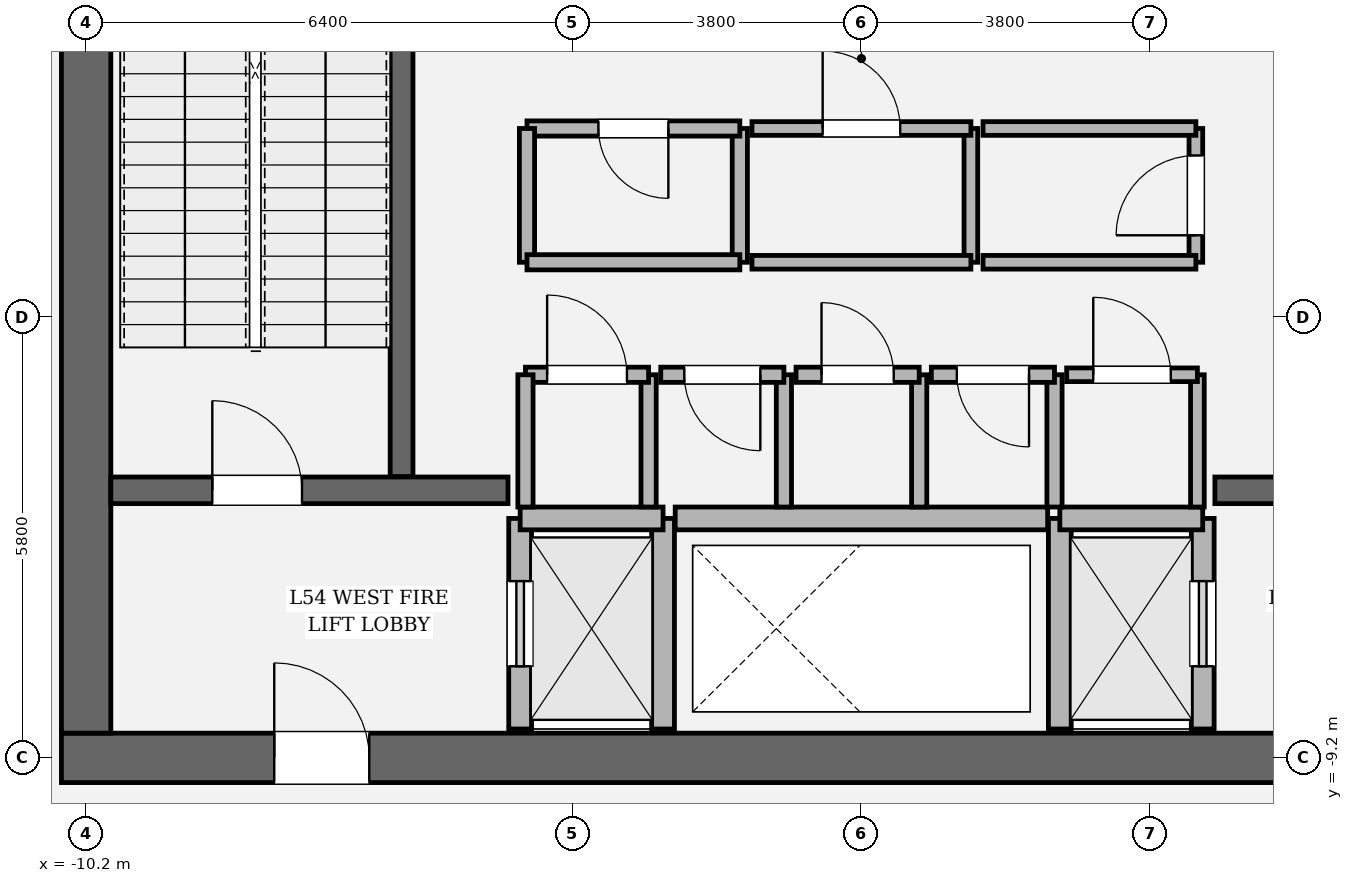
"""IFC4 building model, lengths in metres.
Left out: names, types, materials, properties, quantities, classifications, styles, units other than length and angle.
Written with IfcOpenShell. Run it as: python <this file> out.ifc"""

import sys

from ifc_helpers import new_model, si_unit, direction, frame, frame_2d, origin, place, context, subcontext, project, spatial, rectangle, extrude, element, fill, save


model = new_model("IFC4")
c1 = context("Model", 3, precision=1e-05, world=origin(), true_north=direction((0.0, 1.0)))
c2 = subcontext(c1, "Body", "Model", "MODEL_VIEW")
j1 = project(units=[si_unit("LENGTHUNIT", "METRE"), si_unit("PLANEANGLEUNIT", "RADIAN")], contexts=[c1])
p1 = place(None, origin())
s1 = spatial("IfcSite", under=j1, at=p1, CompositionType="ELEMENT")
p2 = place(p1, origin())
s2 = spatial("IfcBuilding", under=s1, at=p2, CompositionType="ELEMENT")
p3 = place(p2, frame((0.0, 0.0, 228.9)))
s3 = spatial("IfcBuildingStorey", under=s2, at=p3, CompositionType="ELEMENT", Elevation=228.9)
p4 = place(p3, frame((10.525, -9.2, 0.0), z_axis=(0.0, 0.0, 1.0), x_axis=(-1.0, 0.0, 0.0)))
e1 = element("IfcWall", 1, at=p4, inside=s3, PredefinedType="SHEAR", context=c2, shape_type="SweptSolid", body=[
    extrude(rectangle(XDim=21.05, YDim=0.65, at=frame_2d((10.525, 0.0))), origin(), (0.0, 0.0, 1.0), 4.05),
])
p5 = place(p4, frame((2.8, 0.0, 0.0)))
e2 = element("IfcOpeningElement", 2, at=p5, cuts=e1, PredefinedType="OPENING", context=c2, shape_type="SweptSolid", body=[
    extrude(rectangle(XDim=1.25, YDim=2.25, at=frame_2d((0.625, 1.125))), frame((0.0, 0.335, 0.0), z_axis=(0.0, -1.0, 0.0), x_axis=(1.0, 0.0, 0.0)), (0.0, 0.0, 1.0), 0.67),
])
p6 = place(p4, frame((17.0, 0.0, 0.0)))
e3 = element("IfcOpeningElement", 3, at=p6, cuts=e1, PredefinedType="OPENING", context=c2, shape_type="SweptSolid", body=[
    extrude(rectangle(XDim=1.25, YDim=2.25, at=frame_2d((0.625, 1.125))), frame((0.0, 0.335, 0.0), z_axis=(0.0, -1.0, 0.0), x_axis=(1.0, 0.0, 0.0)), (0.0, 0.0, 1.0), 0.67),
])
p7 = place(p3, frame((-10.2, -8.875, 0.0), z_axis=(0.0, 0.0, 1.0), x_axis=(0.0, 1.0, 0.0)))
e4 = element("IfcWall", 4, at=p7, inside=s3, PredefinedType="SHEAR", context=c2, shape_type="SweptSolid", body=[
    extrude(rectangle(XDim=17.75, YDim=0.65, at=frame_2d((8.875, 0.0))), origin(), (0.0, 0.0, 1.0), 4.05),
])
p8 = place(p7, frame((12.665, 0.0, 0.0)))
e5 = element("IfcOpeningElement", 5, at=p8, cuts=e4, PredefinedType="OPENING", context=c2, shape_type="SweptSolid", body=[
    extrude(rectangle(XDim=1.18, YDim=2.2, at=frame_2d((0.59, 1.1))), frame((0.0, 0.335, 0.0), z_axis=(0.0, -1.0, 0.0), x_axis=(1.0, 0.0, 0.0)), (0.0, 0.0, 1.0), 0.67),
])
p9 = place(p3, frame((-6.05, -5.5, 0.0), z_axis=(0.0, 0.0, 1.0), x_axis=(0.0, 1.0, 0.0)))
e6 = element("IfcWall", 6, at=p9, inside=s3, PredefinedType="SOLIDWALL", context=c2, shape_type="SweptSolid", body=[
    extrude(rectangle(XDim=8.95, YDim=0.3, at=frame_2d((4.475, 0.0))), origin(), (0.0, 0.0, 1.0), 4.05),
])
p10 = place(p3, frame((-9.875, -5.68, 0.0), z_axis=(0.0, 0.0, 1.0), x_axis=(1.0, 0.0, 0.0)))
e7 = element("IfcWall", 7, at=p10, inside=s3, PredefinedType="SOLIDWALL", context=c2, shape_type="SweptSolid", body=[
    extrude(rectangle(XDim=5.225, YDim=0.35, at=frame_2d((2.613, 0.0))), origin(), (0.0, 0.0, 1.0), 4.05),
])
p11 = place(p10, frame((1.335, 0.0, 0.0)))
e8 = element("IfcOpeningElement", 8, at=p11, cuts=e7, PredefinedType="OPENING", context=c2, shape_type="SweptSolid", body=[
    extrude(rectangle(XDim=1.18, YDim=2.2, at=frame_2d((0.59, 1.1))), frame((0.0, 0.185, 0.0), z_axis=(0.0, -1.0, 0.0), x_axis=(1.0, 0.0, 0.0)), (0.0, 0.0, 1.0), 0.37),
])
p12 = place(p3, frame((4.65, -5.68, 0.0), z_axis=(0.0, 0.0, 1.0), x_axis=(1.0, 0.0, 0.0)))
e9 = element("IfcWall", 9, at=p12, inside=s3, PredefinedType="SOLIDWALL", context=c2, shape_type="SweptSolid", body=[
    extrude(rectangle(XDim=5.225, YDim=0.35, at=frame_2d((2.613, 0.0))), origin(), (0.0, 0.0, 1.0), 4.05),
])
p13 = place(p12, frame((2.71, 0.0, 0.0)))
e10 = element("IfcOpeningElement", 10, at=p13, cuts=e9, PredefinedType="OPENING", context=c2, shape_type="SweptSolid", body=[
    extrude(rectangle(XDim=1.18, YDim=2.2, at=frame_2d((0.59, 1.1))), frame((0.0, 0.185, 0.0), z_axis=(0.0, -1.0, 0.0), x_axis=(1.0, 0.0, 0.0)), (0.0, 0.0, 1.0), 0.37),
])
p14 = place(p3, frame((-4.49, -8.82, 0.0), z_axis=(0.0, 0.0, 1.0), x_axis=(0.0, 1.0, 0.0)))
e11 = element("IfcWall", 11, at=p14, inside=s3, PredefinedType="SOLIDWALL", context=c2, shape_type="SweptSolid", body=[
    extrude(rectangle(XDim=2.77, YDim=0.3, at=frame_2d((1.385, 0.0))), origin(), (0.0, 0.0, 1.0), 3.83),
])
p15 = place(p14, frame((0.825, 0.0, 0.0)))
e12 = element("IfcOpeningElement", 12, at=p15, cuts=e11, PredefinedType="OPENING", context=c2, shape_type="SweptSolid", body=[
    extrude(rectangle(XDim=1.12, YDim=2.25, at=frame_2d((0.56, 1.125))), frame((0.0, 0.16, 0.0), z_axis=(0.0, -1.0, 0.0), x_axis=(1.0, 0.0, 0.0)), (0.0, 0.0, 1.0), 0.32),
])
p16 = place(p3, frame((-2.61, -8.82, 0.0), z_axis=(0.0, 0.0, 1.0), x_axis=(0.0, 1.0, 0.0)))
e13 = element("IfcWall", 13, at=p16, inside=s3, PredefinedType="SOLIDWALL", context=c2, shape_type="SweptSolid", body=[
    extrude(rectangle(XDim=2.77, YDim=0.3, at=frame_2d((1.385, 0.0))), origin(), (0.0, 0.0, 1.0), 3.83),
])
p17 = place(p3, frame((-4.49, -6.05, 0.0), z_axis=(0.0, 0.0, 1.0), x_axis=(1.0, 0.0, 0.0)))
e14 = element("IfcWall", 14, at=p17, inside=s3, PredefinedType="SOLIDWALL", context=c2, shape_type="SweptSolid", body=[
    extrude(rectangle(XDim=1.88, YDim=0.3, at=frame_2d((0.94, 0.0))), origin(), (0.0, 0.0, 1.0), 3.83),
])
p18 = place(p3, frame((4.49, -8.82, 0.0), z_axis=(0.0, 0.0, 1.0), x_axis=(0.0, 1.0, 0.0)))
e15 = element("IfcWall", 15, at=p18, inside=s3, PredefinedType="SOLIDWALL", context=c2, shape_type="SweptSolid", body=[
    extrude(rectangle(XDim=2.77, YDim=0.3, at=frame_2d((1.385, 0.0))), origin(), (0.0, 0.0, 1.0), 3.83),
])
p19 = place(p18, frame((0.825, 0.0, 0.0)))
e16 = element("IfcOpeningElement", 16, at=p19, cuts=e15, PredefinedType="OPENING", context=c2, shape_type="SweptSolid", body=[
    extrude(rectangle(XDim=1.12, YDim=2.25, at=frame_2d((0.56, 1.125))), frame((0.0, 0.16, 0.0), z_axis=(0.0, -1.0, 0.0), x_axis=(1.0, 0.0, 0.0)), (0.0, 0.0, 1.0), 0.32),
])
p20 = place(p3, frame((2.61, -8.82, 0.0), z_axis=(0.0, 0.0, 1.0), x_axis=(0.0, 1.0, 0.0)))
e17 = element("IfcWall", 17, at=p20, inside=s3, PredefinedType="SOLIDWALL", context=c2, shape_type="SweptSolid", body=[
    extrude(rectangle(XDim=2.77, YDim=0.3, at=frame_2d((1.385, 0.0))), origin(), (0.0, 0.0, 1.0), 3.83),
])
p21 = place(p3, frame((2.61, -6.05, 0.0), z_axis=(0.0, 0.0, 1.0), x_axis=(1.0, 0.0, 0.0)))
e18 = element("IfcWall", 18, at=p21, inside=s3, PredefinedType="SOLIDWALL", context=c2, shape_type="SweptSolid", body=[
    extrude(rectangle(XDim=1.88, YDim=0.3, at=frame_2d((0.94, 0.0))), origin(), (0.0, 0.0, 1.0), 3.83),
])
p22 = place(p3, frame((-2.45, -6.05, 0.0), z_axis=(0.0, 0.0, 1.0), x_axis=(1.0, 0.0, 0.0)))
e19 = element("IfcWall", 19, at=p22, inside=s3, PredefinedType="SOLIDWALL", context=c2, shape_type="SweptSolid", body=[
    extrude(rectangle(XDim=4.9, YDim=0.3, at=frame_2d((2.45, 0.0))), origin(), (0.0, 0.0, 1.0), 3.83),
])
p23 = place(p3, frame((-2.8, -5.9, 0.0), z_axis=(0.0, 0.0, 1.0), x_axis=(0.0, 1.0, 0.0)))
e20 = element("IfcWall", 20, at=p23, inside=s3, PredefinedType="SOLIDWALL", context=c2, shape_type="SweptSolid", body=[
    extrude(rectangle(XDim=1.74, YDim=0.2, at=frame_2d((0.87, 0.0))), origin(), (0.0, 0.0, 1.0), 3.83),
])
p24 = place(p3, frame((-2.8, -4.16, 0.0), z_axis=(0.0, 0.0, 1.0), x_axis=(-1.0, 0.0, 0.0)))
e21 = element("IfcWall", 21, at=p24, inside=s3, PredefinedType="SOLIDWALL", context=c2, shape_type="SweptSolid", body=[
    extrude(rectangle(XDim=1.62, YDim=0.2, at=frame_2d((0.81, 0.0))), origin(), (0.0, 0.0, 1.0), 3.83),
])
p25 = place(p24, frame((0.285, 0.0, 0.0)))
e22 = element("IfcOpeningElement", 22, at=p25, cuts=e21, PredefinedType="OPENING", context=c2, shape_type="SweptSolid", body=[
    extrude(rectangle(XDim=1.05, YDim=2.2, at=frame_2d((0.525, 1.1))), frame((0.0, 0.11, 0.0), z_axis=(0.0, -1.0, 0.0), x_axis=(1.0, 0.0, 0.0)), (0.0, 0.0, 1.0), 0.22),
])
for number, where, z_axis, x_axis in (
    (23, (-4.42, -4.16, 0.0), (0.0, 0.0, 1.0), (0.0, -1.0, 0.0)),
    (24, (-1.02, -5.9, 0.0), (0.0, 0.0, 1.0), (0.0, 1.0, 0.0)),
):
    element("IfcWall", number, at=place(p3, frame(where, z_axis=z_axis, x_axis=x_axis)), inside=s3, PredefinedType="SOLIDWALL", context=c2, shape_type="SweptSolid", body=[
        extrude(rectangle(XDim=1.74, YDim=0.2, at=frame_2d((0.87, 0.0))), origin(), (0.0, 0.0, 1.0), 3.83),
    ])
p26 = place(p3, frame((-1.02, -4.16, 0.0), z_axis=(0.0, 0.0, 1.0), x_axis=(-1.0, 0.0, 0.0)))
e25 = element("IfcWall", 25, at=p26, inside=s3, PredefinedType="SOLIDWALL", context=c2, shape_type="SweptSolid", body=[
    extrude(rectangle(XDim=1.62, YDim=0.2, at=frame_2d((0.81, 0.0))), origin(), (0.0, 0.0, 1.0), 3.83),
])
p27 = place(p26, frame((0.31, 0.0, 0.0)))
e26 = element("IfcOpeningElement", 26, at=p27, cuts=e25, PredefinedType="OPENING", context=c2, shape_type="SweptSolid", body=[
    extrude(rectangle(XDim=1.0, YDim=2.15, at=frame_2d((0.5, 1.075))), frame((0.0, 0.11, 0.0), z_axis=(0.0, -1.0, 0.0), x_axis=(1.0, 0.0, 0.0)), (0.0, 0.0, 1.0), 0.22),
])
p28 = place(p3, frame((0.76, -5.9, 0.0), z_axis=(0.0, 0.0, 1.0), x_axis=(0.0, 1.0, 0.0)))
e27 = element("IfcWall", 27, at=p28, inside=s3, PredefinedType="SOLIDWALL", context=c2, shape_type="SweptSolid", body=[
    extrude(rectangle(XDim=1.74, YDim=0.2, at=frame_2d((0.87, 0.0))), origin(), (0.0, 0.0, 1.0), 3.83),
])
p29 = place(p3, frame((0.76, -4.16, 0.0), z_axis=(0.0, 0.0, 1.0), x_axis=(-1.0, 0.0, 0.0)))
e28 = element("IfcWall", 28, at=p29, inside=s3, PredefinedType="SOLIDWALL", context=c2, shape_type="SweptSolid", body=[
    extrude(rectangle(XDim=1.62, YDim=0.2, at=frame_2d((0.81, 0.0))), origin(), (0.0, 0.0, 1.0), 3.83),
])
p30 = place(p29, frame((0.335, 0.0, 0.0)))
e29 = element("IfcOpeningElement", 29, at=p30, cuts=e28, PredefinedType="OPENING", context=c2, shape_type="SweptSolid", body=[
    extrude(rectangle(XDim=0.95, YDim=2.15, at=frame_2d((0.475, 1.075))), frame((0.0, 0.11, 0.0), z_axis=(0.0, -1.0, 0.0), x_axis=(1.0, 0.0, 0.0)), (0.0, 0.0, 1.0), 0.22),
])
p31 = place(p3, frame((2.54, -5.9, 0.0), z_axis=(0.0, 0.0, 1.0), x_axis=(0.0, 1.0, 0.0)))
e30 = element("IfcWall", 30, at=p31, inside=s3, PredefinedType="SOLIDWALL", context=c2, shape_type="SweptSolid", body=[
    extrude(rectangle(XDim=1.74, YDim=0.2, at=frame_2d((0.87, 0.0))), origin(), (0.0, 0.0, 1.0), 3.83),
])
p32 = place(p3, frame((2.54, -4.16, 0.0), z_axis=(0.0, 0.0, 1.0), x_axis=(-1.0, 0.0, 0.0)))
e31 = element("IfcWall", 31, at=p32, inside=s3, PredefinedType="SOLIDWALL", context=c2, shape_type="SweptSolid", body=[
    extrude(rectangle(XDim=1.62, YDim=0.2, at=frame_2d((0.81, 0.0))), origin(), (0.0, 0.0, 1.0), 3.83),
])
p33 = place(p32, frame((0.335, 0.0, 0.0)))
e32 = element("IfcOpeningElement", 32, at=p33, cuts=e31, PredefinedType="OPENING", context=c2, shape_type="SweptSolid", body=[
    extrude(rectangle(XDim=0.95, YDim=2.15, at=frame_2d((0.475, 1.075))), frame((0.0, 0.11, 0.0), z_axis=(0.0, -1.0, 0.0), x_axis=(1.0, 0.0, 0.0)), (0.0, 0.0, 1.0), 0.22),
])
p34 = place(p3, frame((4.42, -5.9, 0.0), z_axis=(0.0, 0.0, 1.0), x_axis=(0.0, 1.0, 0.0)))
e33 = element("IfcWall", 33, at=p34, inside=s3, PredefinedType="PARTITIONING", context=c2, shape_type="SweptSolid", body=[
    extrude(rectangle(XDim=1.74, YDim=0.18, at=frame_2d((0.87, 0.0))), origin(), (0.0, 0.0, 1.0), 3.83),
])
p35 = place(p3, frame((4.42, -4.16, 0.0), z_axis=(0.0, 0.0, 1.0), x_axis=(-1.0, 0.0, 0.0)))
e34 = element("IfcWall", 34, at=p35, inside=s3, PredefinedType="PARTITIONING", context=c2, shape_type="SweptSolid", body=[
    extrude(rectangle(XDim=1.72, YDim=0.18, at=frame_2d((0.86, 0.0))), origin(), (0.0, 0.0, 1.0), 3.83),
])
p36 = place(p35, frame((0.35, 0.0, 0.0)))
e35 = element("IfcOpeningElement", 35, at=p36, cuts=e34, PredefinedType="OPENING", context=c2, shape_type="SweptSolid", body=[
    extrude(rectangle(XDim=1.02, YDim=2.2, at=frame_2d((0.51, 1.1))), frame((0.0, 0.1, 0.0), z_axis=(0.0, -1.0, 0.0), x_axis=(1.0, 0.0, 0.0)), (0.0, 0.0, 1.0), 0.2),
])
p37 = place(p3, frame((-1.6, -2.68, 0.0), z_axis=(0.0, 0.0, 1.0), x_axis=(0.0, 1.0, 0.0)))
e36 = element("IfcWall", 36, at=p37, inside=s3, PredefinedType="SOLIDWALL", context=c2, shape_type="SweptSolid", body=[
    extrude(rectangle(XDim=1.76, YDim=0.2, at=frame_2d((0.88, 0.0))), origin(), (0.0, 0.0, 1.0), 3.83),
])
p38 = place(p3, frame((-1.6, -0.92, 0.0), z_axis=(0.0, 0.0, 1.0), x_axis=(-1.0, 0.0, 0.0)))
e37 = element("IfcWall", 37, at=p38, inside=s3, PredefinedType="SOLIDWALL", context=c2, shape_type="SweptSolid", body=[
    extrude(rectangle(XDim=2.8, YDim=0.2, at=frame_2d((1.4, 0.0))), origin(), (0.0, 0.0, 1.0), 3.83),
])
p39 = place(p38, frame((0.94, 0.0, 0.0)))
e38 = element("IfcOpeningElement", 38, at=p39, cuts=e37, PredefinedType="OPENING", context=c2, shape_type="SweptSolid", body=[
    extrude(rectangle(XDim=0.92, YDim=2.1, at=frame_2d((0.46, 1.05))), frame((0.0, 0.11, 0.0), z_axis=(0.0, -1.0, 0.0), x_axis=(1.0, 0.0, 0.0)), (0.0, 0.0, 1.0), 0.22),
])
p40 = place(p3, frame((-4.4, -0.92, 0.0), z_axis=(0.0, 0.0, 1.0), x_axis=(0.0, -1.0, 0.0)))
e39 = element("IfcWall", 39, at=p40, inside=s3, PredefinedType="SOLIDWALL", context=c2, shape_type="SweptSolid", body=[
    extrude(rectangle(XDim=1.76, YDim=0.2, at=frame_2d((0.88, 0.0))), origin(), (0.0, 0.0, 1.0), 3.83),
])
p41 = place(p3, frame((-4.4, -2.68, 0.0), z_axis=(0.0, 0.0, 1.0), x_axis=(1.0, 0.0, 0.0)))
e40 = element("IfcWall", 40, at=p41, inside=s3, PredefinedType="SOLIDWALL", context=c2, shape_type="SweptSolid", body=[
    extrude(rectangle(XDim=2.8, YDim=0.2, at=frame_2d((1.4, 0.0))), origin(), (0.0, 0.0, 1.0), 3.83),
])
p42 = place(p3, frame((1.44, -2.68, 0.0), z_axis=(0.0, 0.0, 1.0), x_axis=(0.0, 1.0, 0.0)))
e41 = element("IfcWall", 41, at=p42, inside=s3, PredefinedType="PARTITIONING", context=c2, shape_type="SweptSolid", body=[
    extrude(rectangle(XDim=1.76, YDim=0.18, at=frame_2d((0.88, 0.0))), origin(), (0.0, 0.0, 1.0), 3.83),
])
p43 = place(p3, frame((1.44, -0.92, 0.0), z_axis=(0.0, 0.0, 1.0), x_axis=(-1.0, 0.0, 0.0)))
e42 = element("IfcWall", 42, at=p43, inside=s3, PredefinedType="PARTITIONING", context=c2, shape_type="SweptSolid", body=[
    extrude(rectangle(XDim=2.88, YDim=0.18, at=frame_2d((1.44, 0.0))), origin(), (0.0, 0.0, 1.0), 3.83),
])
p44 = place(p43, frame((0.93, 0.0, 0.0)))
e43 = element("IfcOpeningElement", 43, at=p44, cuts=e42, PredefinedType="OPENING", context=c2, shape_type="SweptSolid", body=[
    extrude(rectangle(XDim=1.02, YDim=2.2, at=frame_2d((0.51, 1.1))), frame((0.0, 0.1, 0.0), z_axis=(0.0, -1.0, 0.0), x_axis=(1.0, 0.0, 0.0)), (0.0, 0.0, 1.0), 0.2),
])
p45 = place(p3, frame((-1.44, -2.68, 0.0), z_axis=(0.0, 0.0, 1.0), x_axis=(1.0, 0.0, 0.0)))
e44 = element("IfcWall", 44, at=p45, inside=s3, PredefinedType="PARTITIONING", context=c2, shape_type="SweptSolid", body=[
    extrude(rectangle(XDim=2.88, YDim=0.18, at=frame_2d((1.44, 0.0))), origin(), (0.0, 0.0, 1.0), 3.83),
])
p46 = place(p3, frame((4.4, -2.68, 0.0), z_axis=(0.0, 0.0, 1.0), x_axis=(0.0, 1.0, 0.0)))
e45 = element("IfcWall", 45, at=p46, inside=s3, PredefinedType="PARTITIONING", context=c2, shape_type="SweptSolid", body=[
    extrude(rectangle(XDim=1.76, YDim=0.18, at=frame_2d((0.88, 0.0))), origin(), (0.0, 0.0, 1.0), 3.83),
])
p47 = place(p46, frame((0.355, 0.0, 0.0)))
e46 = element("IfcOpeningElement", 46, at=p47, cuts=e45, PredefinedType="OPENING", context=c2, shape_type="SweptSolid", body=[
    extrude(rectangle(XDim=1.05, YDim=2.2, at=frame_2d((0.525, 1.1))), frame((0.0, 0.1, 0.0), z_axis=(0.0, -1.0, 0.0), x_axis=(1.0, 0.0, 0.0)), (0.0, 0.0, 1.0), 0.2),
])
for number, where, z_axis, x_axis in (
    (47, (4.4, -0.92, 0.0), (0.0, 0.0, 1.0), (-1.0, 0.0, 0.0)),
    (48, (1.6, -2.68, 0.0), (0.0, 0.0, 1.0), (1.0, 0.0, 0.0)),
):
    element("IfcWall", number, at=place(p3, frame(where, z_axis=z_axis, x_axis=x_axis)), inside=s3, PredefinedType="PARTITIONING", context=c2, shape_type="SweptSolid", body=[
        extrude(rectangle(XDim=2.8, YDim=0.18, at=frame_2d((1.4, 0.0))), origin(), (0.0, 0.0, 1.0), 3.83),
    ])
p48 = place(p11, origin())
e49 = element("IfcDoor", 49, at=p48, inside=s3, OperationType="SINGLE_SWING_LEFT", PredefinedType="DOOR", context=c2, shape_type="SweptSolid", body=[
    extrude(rectangle(XDim=1.18, YDim=2.2, at=frame_2d((0.59, 1.1))), frame((0.0, 0.025, 0.0), z_axis=(0.0, -1.0, 0.0), x_axis=(1.0, 0.0, 0.0)), (0.0, 0.0, 1.0), 0.05),
])
fill(e8, e49)
p49 = place(p6, origin())
e50 = element("IfcDoor", 50, at=p49, inside=s3, OperationType="SINGLE_SWING_RIGHT", PredefinedType="DOOR", context=c2, shape_type="SweptSolid", body=[
    extrude(rectangle(XDim=1.25, YDim=2.25, at=frame_2d((0.625, 1.125))), frame((0.0, 0.025, 0.0), z_axis=(0.0, -1.0, 0.0), x_axis=(1.0, 0.0, 0.0)), (0.0, 0.0, 1.0), 0.05),
])
fill(e3, e50)
p50 = place(p15, origin())
e51 = element("IfcDoor", 51, at=p50, inside=s3, OperationType="SLIDING_TO_LEFT", PredefinedType="DOOR", context=c2, shape_type="SweptSolid", body=[
    extrude(rectangle(XDim=1.12, YDim=2.25, at=frame_2d((0.56, 1.125))), frame((0.0, 0.025, 0.0), z_axis=(0.0, -1.0, 0.0), x_axis=(1.0, 0.0, 0.0)), (0.0, 0.0, 1.0), 0.05),
])
fill(e12, e51)
p51 = place(p19, origin())
e52 = element("IfcDoor", 52, at=p51, inside=s3, OperationType="SLIDING_TO_RIGHT", PredefinedType="DOOR", context=c2, shape_type="SweptSolid", body=[
    extrude(rectangle(XDim=1.12, YDim=2.25, at=frame_2d((0.56, 1.125))), frame((0.0, 0.025, 0.0), z_axis=(0.0, -1.0, 0.0), x_axis=(1.0, 0.0, 0.0)), (0.0, 0.0, 1.0), 0.05),
])
fill(e16, e52)
p52 = place(p25, origin())
e53 = element("IfcDoor", 53, at=p52, inside=s3, OperationType="SINGLE_SWING_RIGHT", PredefinedType="DOOR", context=c2, shape_type="SweptSolid", body=[
    extrude(rectangle(XDim=1.05, YDim=2.2, at=frame_2d((0.525, 1.1))), frame((0.0, 0.025, 0.0), z_axis=(0.0, -1.0, 0.0), x_axis=(1.0, 0.0, 0.0)), (0.0, 0.0, 1.0), 0.05),
])
fill(e22, e53)
p53 = place(p27, origin())
e54 = element("IfcDoor", 54, at=p53, inside=s3, OperationType="SINGLE_SWING_LEFT", PredefinedType="DOOR", context=c2, shape_type="SweptSolid", body=[
    extrude(rectangle(XDim=1.0, YDim=2.15, at=frame_2d((0.5, 1.075))), frame((0.0, 0.025, 0.0), z_axis=(0.0, -1.0, 0.0), x_axis=(1.0, 0.0, 0.0)), (0.0, 0.0, 1.0), 0.05),
])
fill(e26, e54)
p54 = place(p30, origin())
e55 = element("IfcDoor", 55, at=p54, inside=s3, OperationType="SINGLE_SWING_RIGHT", PredefinedType="DOOR", context=c2, shape_type="SweptSolid", body=[
    extrude(rectangle(XDim=0.95, YDim=2.15, at=frame_2d((0.475, 1.075))), frame((0.0, 0.025, 0.0), z_axis=(0.0, -1.0, 0.0), x_axis=(1.0, 0.0, 0.0)), (0.0, 0.0, 1.0), 0.05),
])
fill(e29, e55)
p55 = place(p33, origin())
e56 = element("IfcDoor", 56, at=p55, inside=s3, OperationType="SINGLE_SWING_LEFT", PredefinedType="DOOR", context=c2, shape_type="SweptSolid", body=[
    extrude(rectangle(XDim=0.95, YDim=2.15, at=frame_2d((0.475, 1.075))), frame((0.0, 0.025, 0.0), z_axis=(0.0, -1.0, 0.0), x_axis=(1.0, 0.0, 0.0)), (0.0, 0.0, 1.0), 0.05),
])
fill(e32, e56)
p56 = place(p36, origin())
e57 = element("IfcDoor", 57, at=p56, inside=s3, OperationType="SINGLE_SWING_RIGHT", PredefinedType="DOOR", context=c2, shape_type="SweptSolid", body=[
    extrude(rectangle(XDim=1.02, YDim=2.2, at=frame_2d((0.51, 1.1))), frame((0.0, 0.025, 0.0), z_axis=(0.0, -1.0, 0.0), x_axis=(1.0, 0.0, 0.0)), (0.0, 0.0, 1.0), 0.05),
])
fill(e35, e57)
p57 = place(p39, origin())
e58 = element("IfcDoor", 58, at=p57, inside=s3, OperationType="SINGLE_SWING_LEFT", PredefinedType="DOOR", context=c2, shape_type="SweptSolid", body=[
    extrude(rectangle(XDim=0.92, YDim=2.1, at=frame_2d((0.46, 1.05))), frame((0.0, 0.025, 0.0), z_axis=(0.0, -1.0, 0.0), x_axis=(1.0, 0.0, 0.0)), (0.0, 0.0, 1.0), 0.05),
])
fill(e38, e58)
p58 = place(p44, origin())
e59 = element("IfcDoor", 59, at=p58, inside=s3, OperationType="SINGLE_SWING_RIGHT", PredefinedType="DOOR", context=c2, shape_type="SweptSolid", body=[
    extrude(rectangle(XDim=1.02, YDim=2.2, at=frame_2d((0.51, 1.1))), frame((0.0, 0.025, 0.0), z_axis=(0.0, -1.0, 0.0), x_axis=(1.0, 0.0, 0.0)), (0.0, 0.0, 1.0), 0.05),
])
fill(e43, e59)
p59 = place(p47, origin())
e60 = element("IfcDoor", 60, at=p59, inside=s3, OperationType="SINGLE_SWING_LEFT", PredefinedType="DOOR", context=c2, shape_type="SweptSolid", body=[
    extrude(rectangle(XDim=1.05, YDim=2.2, at=frame_2d((0.525, 1.1))), frame((0.0, 0.025, 0.0), z_axis=(0.0, -1.0, 0.0), x_axis=(1.0, 0.0, 0.0)), (0.0, 0.0, 1.0), 0.05),
])
fill(e46, e60)
save(model, sys.argv[1])
